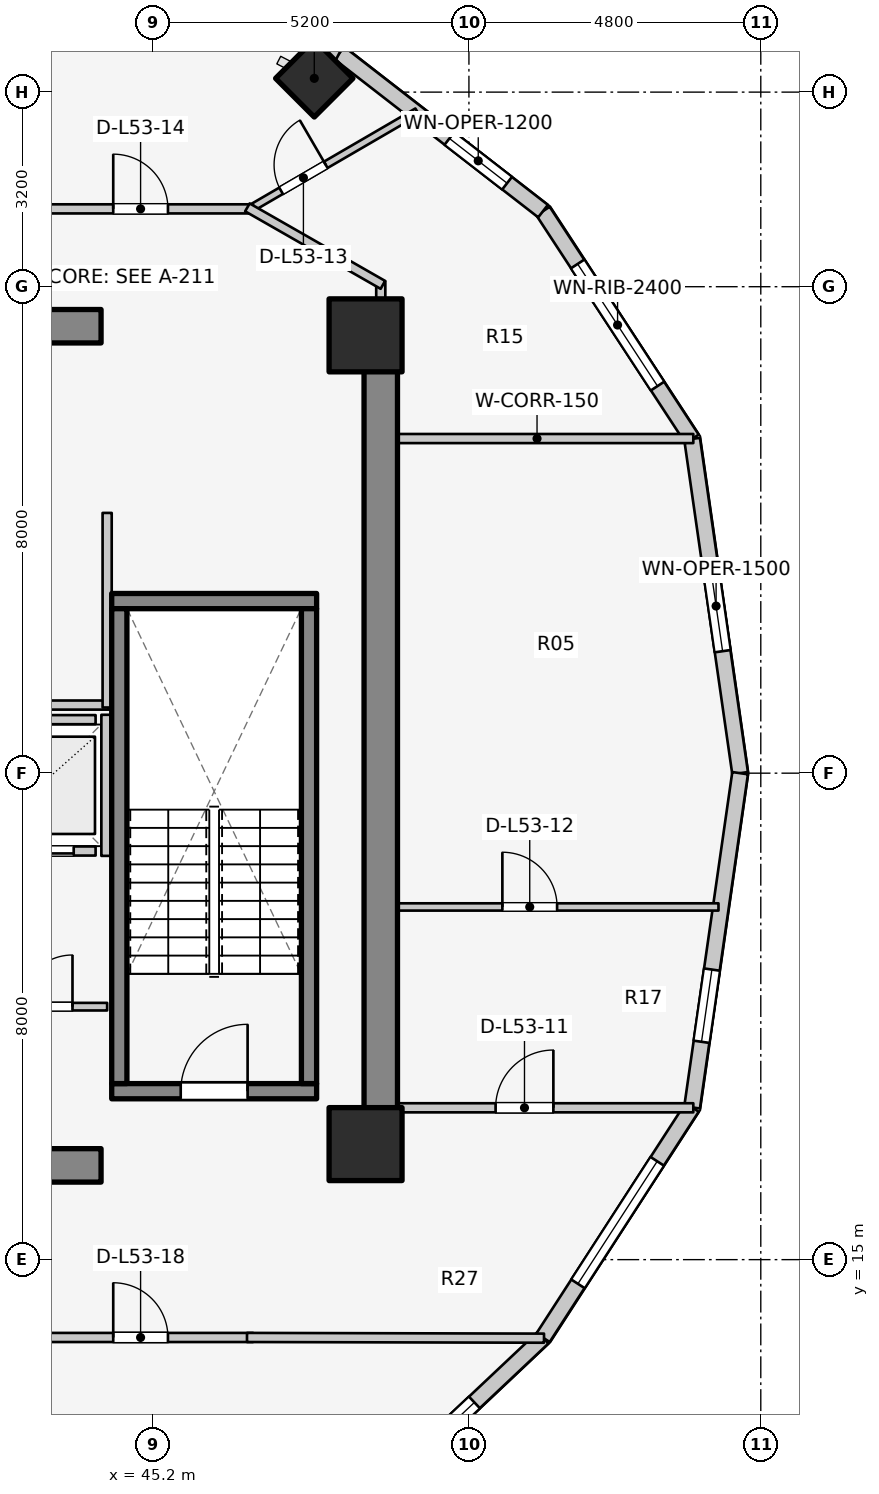
"""IFC4 building model, lengths in metres.
Left out: names, types, materials, properties, quantities, classifications, styles, units other than length and angle.
Written with IfcOpenShell. Run it as: python <this file> out.ifc"""

import sys

from ifc_helpers import new_model, si_unit, direction, frame, frame_2d, origin, origin_2d, place, context, subcontext, project, spatial, rectangle, extrude, element, fill, save


model = new_model("IFC4")
c1 = context("Model", 3, precision=1e-05, world=origin(), true_north=direction((0.0, 1.0)))
c2 = subcontext(c1, "Body", "Model", "MODEL_VIEW")
j1 = project(units=[si_unit("LENGTHUNIT", "METRE"), si_unit("PLANEANGLEUNIT", "RADIAN")], contexts=[c1])
p1 = place(None, origin())
s1 = spatial("IfcSite", under=j1, at=p1, CompositionType="ELEMENT")
p2 = place(p1, origin())
s2 = spatial("IfcBuilding", under=s1, at=p2, CompositionType="ELEMENT")
p3 = place(p2, frame((0.0, 0.0, 174.6)))
s3 = spatial("IfcBuildingStorey", under=s2, at=p3, CompositionType="ELEMENT", Elevation=174.6)
p4 = place(p3, frame((48.95, 17.05, 0.0), z_axis=(0.0, 0.0, 1.0), x_axis=(0.0, 1.0, 0.0)))
e1 = element("IfcWall", 1, at=p4, inside=s3, PredefinedType="SHEAR", context=c2, shape_type="SweptSolid", body=[
    extrude(rectangle(XDim=12.8, YDim=0.55, at=frame_2d((6.4, 0.0))), origin(), (0.0, 0.0, 1.0), 3.1),
])
for number, where, z_axis, x_axis in (
    (2, (39.85, 16.55, 0.0), (0.0, 0.0, 1.0), (1.0, 0.0, 0.0)),
    (3, (39.85, 30.35, 0.0), (0.0, 0.0, 1.0), (1.0, 0.0, 0.0)),
):
    element("IfcWall", number, at=place(p3, frame(where, z_axis=z_axis, x_axis=x_axis)), inside=s3, PredefinedType="SHEAR", context=c2, shape_type="SweptSolid", body=[
        extrude(rectangle(XDim=4.5, YDim=0.55, at=frame_2d((2.25, 0.0))), origin(), (0.0, 0.0, 1.0), 3.1),
    ])
p5 = place(p3, frame((44.525, 17.77, 0.0), z_axis=(0.0, 0.0, 1.0), x_axis=(1.0, 0.0, 0.0)))
e4 = element("IfcWall", 4, at=p5, inside=s3, PredefinedType="SOLIDWALL", context=c2, shape_type="SweptSolid", body=[
    extrude(rectangle(XDim=3.37, YDim=0.25, at=frame_2d((1.685, 0.0))), origin(), (0.0, 0.0, 1.0), 3.1),
])
p6 = place(p5, frame((1.135, 0.0, 0.0)))
e5 = element("IfcOpeningElement", 5, at=p6, cuts=e4, PredefinedType="OPENING", context=c2, shape_type="SweptSolid", body=[
    extrude(rectangle(XDim=1.1, YDim=2.1, at=frame_2d((0.55, 1.05))), frame((0.0, 0.135, 0.0), z_axis=(0.0, -1.0, 0.0), x_axis=(1.0, 0.0, 0.0)), (0.0, 0.0, 1.0), 0.27),
])
p7 = place(p3, frame((44.525, 25.83, 0.0), z_axis=(0.0, 0.0, 1.0), x_axis=(1.0, 0.0, 0.0)))
e6 = element("IfcWall", 6, at=p7, inside=s3, PredefinedType="SOLIDWALL", context=c2, shape_type="SweptSolid", body=[
    extrude(rectangle(XDim=3.37, YDim=0.25, at=frame_2d((1.685, 0.0))), origin(), (0.0, 0.0, 1.0), 3.1),
])
for number, where, z_axis, x_axis in (
    (7, (44.65, 17.895, 0.0), (0.0, 0.0, 1.0), (0.0, 1.0, 0.0)),
    (8, (47.77, 17.895, 0.0), (0.0, 0.0, 1.0), (0.0, 1.0, 0.0)),
):
    element("IfcWall", number, at=place(p3, frame(where, z_axis=z_axis, x_axis=x_axis)), inside=s3, PredefinedType="SOLIDWALL", context=c2, shape_type="SweptSolid", body=[
        extrude(rectangle(XDim=7.81, YDim=0.25, at=frame_2d((3.905, 0.0))), origin(), (0.0, 0.0, 1.0), 3.1),
    ])
for number, where, z_axis, x_axis in (
    (9, (48.7, 16.9, 0.0), (0.0, 0.0, 1.0), (1.0, 0.0, 0.0)),
    (10, (48.7, 30.2, 0.0), (0.0, 0.0, 1.0), (1.0, 0.0, 0.0)),
):
    element("IfcColumn", number, at=place(p3, frame(where, z_axis=z_axis, x_axis=x_axis)), inside=s3, PredefinedType="COLUMN", context=c2, shape_type="SweptSolid", body=[
        extrude(rectangle(XDim=1.2, YDim=1.2, at=origin_2d()), origin(), (0.0, 0.0, 1.0), 3.1),
    ])
p8 = place(p3, frame((47.857, 34.427, 0.0), z_axis=(0.0, 0.0, 1.0), x_axis=(0.707106781187, 0.707106781187, 0.0)))
e11 = element("IfcColumn", 11, at=p8, inside=s3, PredefinedType="COLUMN", context=c2, shape_type="SweptSolid", body=[
    extrude(rectangle(XDim=0.9, YDim=0.9, at=origin_2d()), origin(), (0.0, 0.0, 1.0), 3.1),
])
p9 = place(p3, frame((54.86, 23.0, 0.0), z_axis=(0.0, 0.0, 1.0), x_axis=(-0.142227632286, 0.989833976288, 0.0)))
e12 = element("IfcWall", 12, at=p9, inside=s3, PredefinedType="STANDARD", context=c2, shape_type="SweptSolid", body=[
    extrude(rectangle(XDim=5.553, YDim=0.26, at=frame_2d((2.776, 0.0))), origin(), (0.0, 0.0, 1.0), 2.85),
])
p10 = place(p9, frame((2.027, 0.0, 0.75)))
e13 = element("IfcOpeningElement", 13, at=p10, cuts=e12, PredefinedType="OPENING", context=c2, shape_type="SweptSolid", body=[
    extrude(rectangle(XDim=1.5, YDim=1.6, at=frame_2d((0.75, 0.8))), frame((0.0, 0.14, 0.0), z_axis=(0.0, -1.0, 0.0), x_axis=(1.0, 0.0, 0.0)), (0.0, 0.0, 1.0), 0.28),
])
p11 = place(p3, frame((54.07, 28.497, 0.0), z_axis=(0.0, 0.0, 1.0), x_axis=(-0.547456494366, 0.836834145322, 0.0)))
e14 = element("IfcWall", 14, at=p11, inside=s3, PredefinedType="STANDARD", context=c2, shape_type="SweptSolid", body=[
    extrude(rectangle(XDim=4.477, YDim=0.26, at=frame_2d((2.239, 0.0))), origin(), (0.0, 0.0, 1.0), 2.85),
])
p12 = place(p11, frame((1.039, 0.0, 0.75)))
e15 = element("IfcOpeningElement", 15, at=p12, cuts=e14, PredefinedType="OPENING", context=c2, shape_type="SweptSolid", body=[
    extrude(rectangle(XDim=2.4, YDim=1.7, at=frame_2d((1.2, 0.85))), frame((0.0, 0.14, 0.0), z_axis=(0.0, -1.0, 0.0), x_axis=(1.0, 0.0, 0.0)), (0.0, 0.0, 1.0), 0.28),
])
p13 = place(p3, frame((51.619, 32.243, 0.0), z_axis=(0.0, 0.0, 1.0), x_axis=(-0.790185650662, 0.612867552973, 0.0)))
e16 = element("IfcWall", 16, at=p13, inside=s3, PredefinedType="STANDARD", context=c2, shape_type="SweptSolid", body=[
    extrude(rectangle(XDim=4.239, YDim=0.26, at=frame_2d((2.12, 0.0))), origin(), (0.0, 0.0, 1.0), 2.85),
])
p14 = place(p13, frame((0.749, 0.0, 0.75)))
e17 = element("IfcOpeningElement", 17, at=p14, cuts=e16, PredefinedType="OPENING", context=c2, shape_type="SweptSolid", body=[
    extrude(rectangle(XDim=1.2, YDim=1.5, at=frame_2d((0.6, 0.75))), frame((0.0, 0.14, 0.0), z_axis=(0.0, -1.0, 0.0), x_axis=(1.0, 0.0, 0.0)), (0.0, 0.0, 1.0), 0.28),
])
p15 = place(p3, frame((48.269, 34.842, 0.0), z_axis=(0.0, 0.0, 1.0), x_axis=(-0.885660265226, 0.464333818065, 0.0)))
e18 = element("IfcWall", 18, at=p15, inside=s3, PredefinedType="STANDARD", context=c2, shape_type="SweptSolid", body=[
    extrude(rectangle(XDim=4.354, YDim=0.26, at=frame_2d((2.177, 0.0))), origin(), (0.0, 0.0, 1.0), 2.85),
])
p16 = place(p3, frame((48.269, 10.559, 0.0), z_axis=(0.0, 0.0, 1.0), x_axis=(0.727667301037, 0.68593024354, 0.0)))
e19 = element("IfcWall", 19, at=p16, inside=s3, PredefinedType="STANDARD", context=c2, shape_type="SweptSolid", body=[
    extrude(rectangle(XDim=4.604, YDim=0.26, at=frame_2d((2.302, 0.0))), origin(), (0.0, 0.0, 1.0), 2.85),
])
p17 = place(p16, frame((1.552, 0.0, 0.75)))
e20 = element("IfcOpeningElement", 20, at=p17, cuts=e19, PredefinedType="OPENING", context=c2, shape_type="SweptSolid", body=[
    extrude(rectangle(XDim=1.5, YDim=1.6, at=frame_2d((0.75, 0.8))), frame((0.0, 0.14, 0.0), z_axis=(0.0, -1.0, 0.0), x_axis=(1.0, 0.0, 0.0)), (0.0, 0.0, 1.0), 0.28),
])
p18 = place(p3, frame((51.619, 13.716, 0.0), z_axis=(0.0, 0.0, 1.0), x_axis=(0.543358984534, 0.839500454989, 0.0)))
e21 = element("IfcWall", 21, at=p18, inside=s3, PredefinedType="STANDARD", context=c2, shape_type="SweptSolid", body=[
    extrude(rectangle(XDim=4.511, YDim=0.26, at=frame_2d((2.256, 0.0))), origin(), (0.0, 0.0, 1.0), 2.85),
])
p19 = place(p18, frame((1.056, 0.0, 0.75)))
e22 = element("IfcOpeningElement", 22, at=p19, cuts=e21, PredefinedType="OPENING", context=c2, shape_type="SweptSolid", body=[
    extrude(rectangle(XDim=2.4, YDim=1.7, at=frame_2d((1.2, 0.85))), frame((0.0, 0.14, 0.0), z_axis=(0.0, -1.0, 0.0), x_axis=(1.0, 0.0, 0.0)), (0.0, 0.0, 1.0), 0.28),
])
p20 = place(p3, frame((54.07, 17.503, 0.0), z_axis=(0.0, 0.0, 1.0), x_axis=(0.142227632286, 0.989833976288, 0.0)))
e23 = element("IfcWall", 23, at=p20, inside=s3, PredefinedType="STANDARD", context=c2, shape_type="SweptSolid", body=[
    extrude(rectangle(XDim=5.553, YDim=0.26, at=frame_2d((2.776, 0.0))), origin(), (0.0, 0.0, 1.0), 2.85),
])
p21 = place(p20, frame((1.09, 0.0, 0.75)))
e24 = element("IfcOpeningElement", 24, at=p21, cuts=e23, PredefinedType="OPENING", context=c2, shape_type="SweptSolid", body=[
    extrude(rectangle(XDim=1.2, YDim=1.5, at=frame_2d((0.6, 0.75))), frame((0.0, 0.14, 0.0), z_axis=(0.0, -1.0, 0.0), x_axis=(1.0, 0.0, 0.0)), (0.0, 0.0, 1.0), 0.28),
])
p22 = place(p3, frame((42.44, 21.72, 0.0), z_axis=(0.0, 0.0, 1.0), x_axis=(1.0, 0.0, 0.0)))
e25 = element("IfcWall", 25, at=p22, inside=s3, PredefinedType="SOLIDWALL", context=c2, shape_type="SweptSolid", body=[
    extrude(rectangle(XDim=1.82, YDim=0.15, at=frame_2d((0.91, 0.0))), origin(), (0.0, 0.0, 1.0), 2.855),
])
p23 = place(p22, frame((0.36, 0.0, 0.0)))
e26 = element("IfcOpeningElement", 26, at=p23, cuts=e25, PredefinedType="OPENING", context=c2, shape_type="SweptSolid", body=[
    extrude(rectangle(XDim=1.1, YDim=2.1, at=frame_2d((0.55, 1.05))), frame((0.0, 0.085, 0.0), z_axis=(0.0, -1.0, 0.0), x_axis=(1.0, 0.0, 0.0)), (0.0, 0.0, 1.0), 0.17),
])
p24 = place(p3, frame((42.44, 23.88, 0.0), z_axis=(0.0, 0.0, 1.0), x_axis=(1.0, 0.0, 0.0)))
e27 = element("IfcWall", 27, at=p24, inside=s3, PredefinedType="SOLIDWALL", context=c2, shape_type="SweptSolid", body=[
    extrude(rectangle(XDim=1.82, YDim=0.15, at=frame_2d((0.91, 0.0))), origin(), (0.0, 0.0, 1.0), 2.855),
])
p25 = place(p3, frame((44.43, 21.64, 0.0), z_axis=(0.0, 0.0, 1.0), x_axis=(0.0, 1.0, 0.0)))
e28 = element("IfcWall", 28, at=p25, inside=s3, PredefinedType="SOLIDWALL", context=c2, shape_type="SweptSolid", body=[
    extrude(rectangle(XDim=2.32, YDim=0.15, at=frame_2d((1.16, 0.0))), origin(), (0.0, 0.0, 1.0), 2.855),
])
p26 = place(p3, frame((39.4, 24.12, 0.0), z_axis=(0.0, 0.0, 1.0), x_axis=(1.0, 0.0, 0.0)))
e29 = element("IfcWall", 29, at=p26, inside=s3, PredefinedType="PARTITIONING", context=c2, shape_type="SweptSolid", body=[
    extrude(rectangle(XDim=5.08, YDim=0.15, at=frame_2d((2.54, 0.0))), origin(), (0.0, 0.0, 1.0), 2.12),
])
p27 = place(p3, frame((44.45, 24.08, 0.0), z_axis=(0.0, 0.0, 1.0), x_axis=(0.0, 1.0, 0.0)))
e30 = element("IfcWall", 30, at=p27, inside=s3, PredefinedType="PARTITIONING", context=c2, shape_type="SweptSolid", body=[
    extrude(rectangle(XDim=3.2, YDim=0.15, at=frame_2d((1.6, 0.0))), origin(), (0.0, 0.0, 1.0), 2.855),
])
p28 = place(p3, frame((39.58, 19.16, 0.0), z_axis=(0.0, 0.0, 1.0), x_axis=(1.0, 0.0, 0.0)))
e31 = element("IfcWall", 31, at=p28, inside=s3, PredefinedType="PARTITIONING", context=c2, shape_type="SweptSolid", body=[
    extrude(rectangle(XDim=4.87, YDim=0.125, at=frame_2d((2.435, 0.0))), origin(), (0.0, 0.0, 1.0), 2.12),
])
p29 = place(p28, frame((3.45, 0.0, 0.0)))
e32 = element("IfcOpeningElement", 32, at=p29, cuts=e31, PredefinedType="OPENING", context=c2, shape_type="SweptSolid", body=[
    extrude(rectangle(XDim=0.85, YDim=2.05, at=frame_2d((0.425, 1.025))), frame((0.0, 0.073, 0.0), z_axis=(0.0, -1.0, 0.0), x_axis=(1.0, 0.0, 0.0)), (0.0, 0.0, 1.0), 0.145),
])
p30 = place(p3, frame((48.95, 17.497, 0.0), z_axis=(0.0, 0.0, 1.0), x_axis=(1.0, 0.0, 0.0)))
e33 = element("IfcWall", 33, at=p30, inside=s3, PredefinedType="PARTITIONING", context=c2, shape_type="SweptSolid", body=[
    extrude(rectangle(XDim=5.14, YDim=0.15, at=frame_2d((2.57, 0.0))), origin(), (0.0, 0.0, 1.0), 2.855),
])
p31 = place(p30, frame((1.889, 0.0, 0.0)))
e34 = element("IfcOpeningElement", 34, at=p31, cuts=e33, PredefinedType="OPENING", context=c2, shape_type="SweptSolid", body=[
    extrude(rectangle(XDim=0.95, YDim=2.1, at=frame_2d((0.475, 1.05))), frame((0.0, 0.085, 0.0), z_axis=(0.0, -1.0, 0.0), x_axis=(1.0, 0.0, 0.0)), (0.0, 0.0, 1.0), 0.17),
])
p32 = place(p3, frame((48.95, 28.503, 0.0), z_axis=(0.0, 0.0, 1.0), x_axis=(1.0, 0.0, 0.0)))
e35 = element("IfcWall", 35, at=p32, inside=s3, PredefinedType="PARTITIONING", context=c2, shape_type="SweptSolid", body=[
    extrude(rectangle(XDim=5.14, YDim=0.15, at=frame_2d((2.57, 0.0))), origin(), (0.0, 0.0, 1.0), 2.855),
])
p33 = place(p3, frame((48.95, 20.8, 0.0), z_axis=(0.0, 0.0, 1.0), x_axis=(1.0, 0.0, 0.0)))
e36 = element("IfcWall", 36, at=p33, inside=s3, PredefinedType="MOVABLE", context=c2, shape_type="SweptSolid", body=[
    extrude(rectangle(XDim=5.554, YDim=0.12, at=frame_2d((2.777, 0.0))), origin(), (0.0, 0.0, 1.0), 2.855),
])
p34 = place(p33, frame((2.0, 0.0, 0.0)))
e37 = element("IfcOpeningElement", 37, at=p34, cuts=e36, PredefinedType="OPENING", context=c2, shape_type="SweptSolid", body=[
    extrude(rectangle(XDim=0.9, YDim=2.1, at=frame_2d((0.45, 1.05))), frame((0.0, 0.07, 0.0), z_axis=(0.0, -1.0, 0.0), x_axis=(1.0, 0.0, 0.0)), (0.0, 0.0, 1.0), 0.14),
])
p35 = place(p3, frame((48.95, 29.8, 0.0), z_axis=(0.0, 0.0, 1.0), x_axis=(0.0, 1.0, 0.0)))
e38 = element("IfcWall", 38, at=p35, inside=s3, PredefinedType="PARTITIONING", context=c2, shape_type="SweptSolid", body=[
    extrude(rectangle(XDim=1.29, YDim=0.15, at=frame_2d((0.645, 0.0))), origin(), (0.0, 0.0, 1.0), 2.855),
])
p36 = place(p3, frame((46.757, 32.255, 0.0), z_axis=(0.0, 0.0, 1.0), x_axis=(0.864408655832, 0.502789892224, 0.0)))
e39 = element("IfcWall", 39, at=p36, inside=s3, PredefinedType="MOVABLE", context=c2, shape_type="SweptSolid", body=[
    extrude(rectangle(XDim=3.23, YDim=0.12, at=frame_2d((1.615, 0.0))), origin(), (0.0, 0.0, 1.0), 2.22),
])
p37 = place(p36, frame((0.641, 0.0, 0.0)))
e40 = element("IfcOpeningElement", 40, at=p37, cuts=e39, PredefinedType="OPENING", context=c2, shape_type="SweptSolid", body=[
    extrude(rectangle(XDim=0.85, YDim=2.05, at=frame_2d((0.425, 1.025))), frame((0.0, 0.07, 0.0), z_axis=(0.0, -1.0, 0.0), x_axis=(1.0, 0.0, 0.0)), (0.0, 0.0, 1.0), 0.14),
])
p38 = place(p3, frame((39.33, 32.28, 0.0), z_axis=(0.0, 0.0, 1.0), x_axis=(1.0, 0.0, 0.0)))
e41 = element("IfcWall", 41, at=p38, inside=s3, PredefinedType="PARTITIONING", context=c2, shape_type="SweptSolid", body=[
    extrude(rectangle(XDim=7.52, YDim=0.15, at=frame_2d((3.76, 0.0))), origin(), (0.0, 0.0, 1.0), 2.299),
])
p39 = place(p38, frame((5.22, 0.0, 0.0)))
e42 = element("IfcOpeningElement", 42, at=p39, cuts=e41, PredefinedType="OPENING", context=c2, shape_type="SweptSolid", body=[
    extrude(rectangle(XDim=0.9, YDim=2.1, at=frame_2d((0.45, 1.05))), frame((0.0, 0.085, 0.0), z_axis=(0.0, -1.0, 0.0), x_axis=(1.0, 0.0, 0.0)), (0.0, 0.0, 1.0), 0.17),
])
p40 = place(p3, frame((46.757, 32.305, 0.0), z_axis=(0.0, 0.0, 1.0), x_axis=(0.867991349648, -0.496579315857, 0.0)))
e43 = element("IfcWall", 43, at=p40, inside=s3, PredefinedType="PARTITIONING", context=c2, shape_type="SweptSolid", body=[
    extrude(rectangle(XDim=2.567, YDim=0.15, at=frame_2d((1.283, 0.0))), origin(), (0.0, 0.0, 1.0), 2.22),
])
p41 = place(p3, frame((39.33, 13.72, 0.0), z_axis=(0.0, 0.0, 1.0), x_axis=(1.0, 0.0, 0.0)))
e44 = element("IfcWall", 44, at=p41, inside=s3, PredefinedType="PARTITIONING", context=c2, shape_type="SweptSolid", body=[
    extrude(rectangle(XDim=7.52, YDim=0.15, at=frame_2d((3.76, 0.0))), origin(), (0.0, 0.0, 1.0), 2.299),
])
p42 = place(p41, frame((5.22, 0.0, 0.0)))
e45 = element("IfcOpeningElement", 45, at=p42, cuts=e44, PredefinedType="OPENING", context=c2, shape_type="SweptSolid", body=[
    extrude(rectangle(XDim=0.9, YDim=2.1, at=frame_2d((0.45, 1.05))), frame((0.0, 0.085, 0.0), z_axis=(0.0, -1.0, 0.0), x_axis=(1.0, 0.0, 0.0)), (0.0, 0.0, 1.0), 0.17),
])
p43 = place(p3, frame((46.75, 13.72, 0.0), z_axis=(0.0, 0.0, 1.0), x_axis=(0.999997122315, -0.00239903348, 0.0)))
e46 = element("IfcWall", 46, at=p43, inside=s3, PredefinedType="PARTITIONING", context=c2, shape_type="SweptSolid", body=[
    extrude(rectangle(XDim=4.885, YDim=0.15, at=frame_2d((2.442, 0.0))), origin(), (0.0, 0.0, 1.0), 2.22),
])
p44 = place(p3, frame((37.943, 33.914, 0.0), z_axis=(0.0, 0.0, 1.0), x_axis=(0.944182779284, 0.329422038278, 0.0)))
e47 = element("IfcWall", 47, at=p44, inside=s3, PredefinedType="PARTITIONING", context=c2, shape_type="SweptSolid", body=[
    extrude(rectangle(XDim=6.291, YDim=0.125, at=frame_2d((3.146, 0.0))), origin(), (0.0, 0.0, 1.0), 2.299),
])
p45 = place(p10, origin())
e48 = element("IfcWindow", 48, at=p45, inside=s3, PartitioningType="SINGLE_PANEL", PredefinedType="WINDOW", context=c2, shape_type="SweptSolid", body=[
    extrude(rectangle(XDim=1.5, YDim=1.6, at=frame_2d((0.75, 0.8))), frame((0.0, 0.03, 0.0), z_axis=(0.0, -1.0, 0.0), x_axis=(1.0, 0.0, 0.0)), (0.0, 0.0, 1.0), 0.06),
])
fill(e13, e48)
p46 = place(p12, origin())
e49 = element("IfcWindow", 49, at=p46, inside=s3, PartitioningType="SINGLE_PANEL", PredefinedType="WINDOW", context=c2, shape_type="SweptSolid", body=[
    extrude(rectangle(XDim=2.4, YDim=1.7, at=frame_2d((1.2, 0.85))), frame((0.0, 0.03, 0.0), z_axis=(0.0, -1.0, 0.0), x_axis=(1.0, 0.0, 0.0)), (0.0, 0.0, 1.0), 0.06),
])
fill(e15, e49)
p47 = place(p14, origin())
e50 = element("IfcWindow", 50, at=p47, inside=s3, PartitioningType="SINGLE_PANEL", PredefinedType="WINDOW", context=c2, shape_type="SweptSolid", body=[
    extrude(rectangle(XDim=1.2, YDim=1.5, at=frame_2d((0.6, 0.75))), frame((0.0, 0.03, 0.0), z_axis=(0.0, -1.0, 0.0), x_axis=(1.0, 0.0, 0.0)), (0.0, 0.0, 1.0), 0.06),
])
fill(e17, e50)
p48 = place(p17, origin())
e51 = element("IfcWindow", 51, at=p48, inside=s3, PartitioningType="SINGLE_PANEL", PredefinedType="WINDOW", context=c2, shape_type="SweptSolid", body=[
    extrude(rectangle(XDim=1.5, YDim=1.6, at=frame_2d((0.75, 0.8))), frame((0.0, 0.03, 0.0), z_axis=(0.0, -1.0, 0.0), x_axis=(1.0, 0.0, 0.0)), (0.0, 0.0, 1.0), 0.06),
])
fill(e20, e51)
p49 = place(p19, origin())
e52 = element("IfcWindow", 52, at=p49, inside=s3, PartitioningType="SINGLE_PANEL", PredefinedType="WINDOW", context=c2, shape_type="SweptSolid", body=[
    extrude(rectangle(XDim=2.4, YDim=1.7, at=frame_2d((1.2, 0.85))), frame((0.0, 0.03, 0.0), z_axis=(0.0, -1.0, 0.0), x_axis=(1.0, 0.0, 0.0)), (0.0, 0.0, 1.0), 0.06),
])
fill(e22, e52)
p50 = place(p21, origin())
e53 = element("IfcWindow", 53, at=p50, inside=s3, PartitioningType="SINGLE_PANEL", PredefinedType="WINDOW", context=c2, shape_type="SweptSolid", body=[
    extrude(rectangle(XDim=1.2, YDim=1.5, at=frame_2d((0.6, 0.75))), frame((0.0, 0.03, 0.0), z_axis=(0.0, -1.0, 0.0), x_axis=(1.0, 0.0, 0.0)), (0.0, 0.0, 1.0), 0.06),
])
fill(e24, e53)
p51 = place(p6, origin())
e54 = element("IfcDoor", 54, at=p51, inside=s3, OperationType="SINGLE_SWING_RIGHT", PredefinedType="DOOR", context=c2, shape_type="SweptSolid", body=[
    extrude(rectangle(XDim=1.1, YDim=2.1, at=frame_2d((0.55, 1.05))), frame((0.0, 0.025, 0.0), z_axis=(0.0, -1.0, 0.0), x_axis=(1.0, 0.0, 0.0)), (0.0, 0.0, 1.0), 0.05),
])
fill(e5, e54)
p52 = place(p23, origin())
e55 = element("IfcDoor", 55, at=p52, inside=s3, OperationType="DOUBLE_DOOR_SLIDING", PredefinedType="DOOR", context=c2, shape_type="SweptSolid", body=[
    extrude(rectangle(XDim=1.1, YDim=2.1, at=frame_2d((0.55, 1.05))), frame((0.0, 0.025, 0.0), z_axis=(0.0, -1.0, 0.0), x_axis=(1.0, 0.0, 0.0)), (0.0, 0.0, 1.0), 0.05),
])
fill(e26, e55)
p53 = place(p29, origin())
e56 = element("IfcDoor", 56, at=p53, inside=s3, OperationType="SINGLE_SWING_RIGHT", PredefinedType="DOOR", context=c2, shape_type="SweptSolid", body=[
    extrude(rectangle(XDim=0.85, YDim=2.05, at=frame_2d((0.425, 1.025))), frame((0.0, 0.025, 0.0), z_axis=(0.0, -1.0, 0.0), x_axis=(1.0, 0.0, 0.0)), (0.0, 0.0, 1.0), 0.05),
])
fill(e32, e56)
p54 = place(p31, origin())
e57 = element("IfcDoor", 57, at=p54, inside=s3, OperationType="SINGLE_SWING_RIGHT", PredefinedType="DOOR", context=c2, shape_type="SweptSolid", body=[
    extrude(rectangle(XDim=0.95, YDim=2.1, at=frame_2d((0.475, 1.05))), frame((0.0, 0.025, 0.0), z_axis=(0.0, -1.0, 0.0), x_axis=(1.0, 0.0, 0.0)), (0.0, 0.0, 1.0), 0.05),
])
fill(e34, e57)
p55 = place(p34, origin())
e58 = element("IfcDoor", 58, at=p55, inside=s3, OperationType="SINGLE_SWING_LEFT", PredefinedType="DOOR", context=c2, shape_type="SweptSolid", body=[
    extrude(rectangle(XDim=0.9, YDim=2.1, at=frame_2d((0.45, 1.05))), frame((0.0, 0.025, 0.0), z_axis=(0.0, -1.0, 0.0), x_axis=(1.0, 0.0, 0.0)), (0.0, 0.0, 1.0), 0.05),
])
fill(e37, e58)
p56 = place(p37, origin())
e59 = element("IfcDoor", 59, at=p56, inside=s3, OperationType="SINGLE_SWING_RIGHT", PredefinedType="DOOR", context=c2, shape_type="SweptSolid", body=[
    extrude(rectangle(XDim=0.85, YDim=2.05, at=frame_2d((0.425, 1.025))), frame((0.0, 0.025, 0.0), z_axis=(0.0, -1.0, 0.0), x_axis=(1.0, 0.0, 0.0)), (0.0, 0.0, 1.0), 0.05),
])
fill(e40, e59)
p57 = place(p39, origin())
e60 = element("IfcDoor", 60, at=p57, inside=s3, OperationType="SINGLE_SWING_LEFT", PredefinedType="DOOR", context=c2, shape_type="SweptSolid", body=[
    extrude(rectangle(XDim=0.9, YDim=2.1, at=frame_2d((0.45, 1.05))), frame((0.0, 0.025, 0.0), z_axis=(0.0, -1.0, 0.0), x_axis=(1.0, 0.0, 0.0)), (0.0, 0.0, 1.0), 0.05),
])
fill(e42, e60)
p58 = place(p42, origin())
e61 = element("IfcDoor", 61, at=p58, inside=s3, OperationType="SINGLE_SWING_LEFT", PredefinedType="DOOR", context=c2, shape_type="SweptSolid", body=[
    extrude(rectangle(XDim=0.9, YDim=2.1, at=frame_2d((0.45, 1.05))), frame((0.0, 0.025, 0.0), z_axis=(0.0, -1.0, 0.0), x_axis=(1.0, 0.0, 0.0)), (0.0, 0.0, 1.0), 0.05),
])
fill(e45, e61)
save(model, sys.argv[1])
